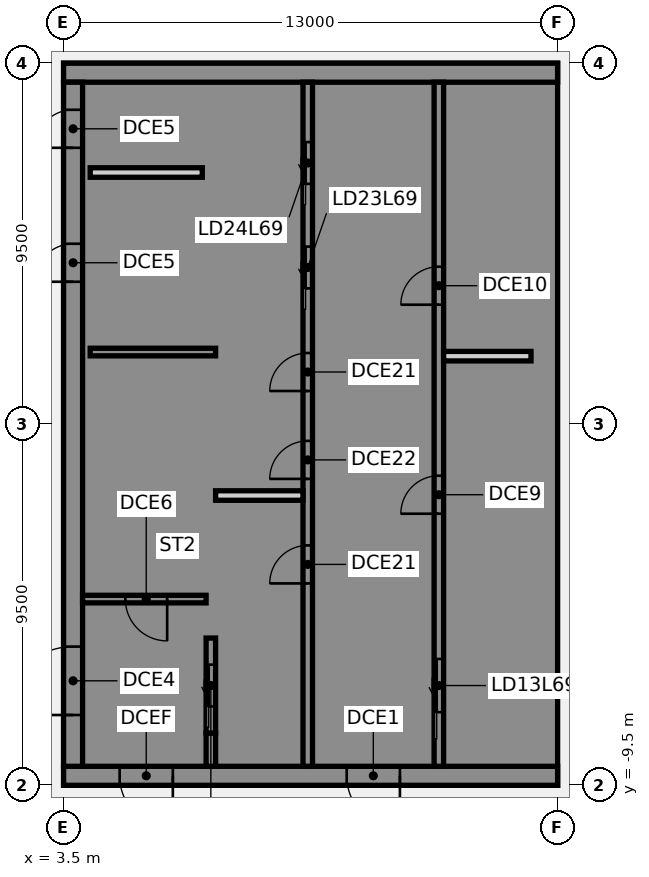
"""IFC4 building model, lengths in metres.
Left out: names, types, materials, properties, quantities, classifications, styles, units other than length and angle.
Written with IfcOpenShell. Run it as: python <this file> out.ifc"""

import sys

from ifc_helpers import new_model, si_unit, direction, frame, frame_2d, origin, place, context, subcontext, project, spatial, polyline, rectangle, outline, extrude, element, fill, save


model = new_model("IFC4")
c1 = context("Model", 3, precision=1e-05, world=origin(), true_north=direction((0.0, 1.0)))
c2 = subcontext(c1, "Body", "Model", "MODEL_VIEW")
j1 = project(units=[si_unit("LENGTHUNIT", "METRE"), si_unit("PLANEANGLEUNIT", "RADIAN")], contexts=[c1])
p1 = place(None, origin())
s1 = spatial("IfcSite", under=j1, at=p1, CompositionType="ELEMENT")
p2 = place(p1, origin())
s2 = spatial("IfcBuilding", under=s1, at=p2, CompositionType="ELEMENT")
p3 = place(p2, frame((0.0, 0.0, 271.2)))
s3 = spatial("IfcBuildingStorey", under=s2, at=p3, CompositionType="ELEMENT", Elevation=271.2)
p4 = place(p3, frame((16.5, -9.25, 0.0), z_axis=(0.0, 0.0, 1.0), x_axis=(-1.0, 0.0, 0.0)))
e1 = element("IfcWall", 1, at=p4, inside=s3, PredefinedType="SHEAR", context=c2, shape_type="SweptSolid", body=[
    extrude(rectangle(XDim=13.0, YDim=0.5, at=frame_2d((6.5, 0.0))), origin(), (0.0, 0.0, 1.0), 3.46),
])
p5 = place(p4, frame((4.15, 0.0, 0.0)))
e2 = element("IfcOpeningElement", 2, at=p5, cuts=e1, PredefinedType="OPENING", context=c2, shape_type="SweptSolid", body=[
    extrude(rectangle(XDim=1.4, YDim=2.1, at=frame_2d((0.7, 1.05))), frame((0.0, 0.26, 0.0), z_axis=(0.0, -1.0, 0.0), x_axis=(1.0, 0.0, 0.0)), (0.0, 0.0, 1.0), 0.52),
])
p6 = place(p4, frame((10.125, 0.0, 0.0)))
e3 = element("IfcOpeningElement", 3, at=p6, cuts=e1, PredefinedType="OPENING", context=c2, shape_type="SweptSolid", body=[
    extrude(rectangle(XDim=1.4, YDim=2.1, at=frame_2d((0.7, 1.05))), frame((0.0, 0.26, 0.0), z_axis=(0.0, -1.0, 0.0), x_axis=(1.0, 0.0, 0.0)), (0.0, 0.0, 1.0), 0.52),
])
p7 = place(p3, origin())
e4 = element("IfcWall", 4, at=p7, inside=s3, PredefinedType="SHEAR", context=c2, shape_type="SweptSolid", body=[
    extrude(outline(polyline([(13.5, -8.125), (13.5, -9.0), (16.0, -9.0), (16.5, -9.0), (16.5, 9.0), (16.0, 9.0), (13.5, 9.0), (13.5, 8.125), (16.0, 8.125), (16.0, 5.625), (13.5, 5.625), (13.5, 5.375), (16.0, 5.375), (16.0, -5.375), (13.5, -5.375), (13.5, -5.625), (16.0, -5.625), (16.0, -8.125), (13.5, -8.125)])), origin(), (0.0, 0.0, 1.0), 3.46),
])
p8 = place(p3, frame((16.5, 9.25, 0.0), z_axis=(0.0, 0.0, 1.0), x_axis=(-1.0, 0.0, 0.0)))
e5 = element("IfcWall", 5, at=p8, inside=s3, PredefinedType="SHEAR", context=c2, shape_type="SweptSolid", body=[
    extrude(rectangle(XDim=13.0, YDim=0.5, at=frame_2d((6.5, 0.0))), origin(), (0.0, 0.0, 1.0), 3.46),
])
p9 = place(p3, origin())
e6 = element("IfcWall", 6, at=p9, inside=s3, PredefinedType="SHEAR", context=c2, shape_type="SweptSolid", body=[
    extrude(outline(polyline([(9.8, -5.375), (7.5, -5.375), (7.5, 2.625), (9.8, 2.625), (9.8, 2.875), (7.5, 2.875), (7.5, 5.375), (9.8, 5.375), (9.8, 5.625), (7.5, 5.625), (7.5, 8.125), (9.8, 8.125), (9.8, 9.0), (7.5, 9.0), (7.25, 9.0), (7.25, -5.625), (7.5, -5.625), (9.8, -5.625), (9.8, -5.375)])), origin(), (0.0, 0.0, 1.0), 3.46),
])
p10 = place(p3, origin())
e7 = element("IfcWall", 7, at=p10, inside=s3, PredefinedType="SHEAR", context=c2, shape_type="SweptSolid", body=[
    extrude(outline(polyline([(7.5, -8.125), (7.5, -9.0), (9.8, -9.0), (9.8, -8.125), (9.8, -5.625), (9.55, -5.625), (9.55, -8.125), (7.5, -8.125)])), origin(), (0.0, 0.0, 1.0), 3.46),
])
p11 = place(p3, frame((7.375, -9.0, 0.0), z_axis=(0.0, 0.0, 1.0), x_axis=(0.0, 1.0, 0.0)))
e8 = element("IfcWall", 8, at=p11, inside=s3, PredefinedType="SHEAR", context=c2, shape_type="SweptSolid", body=[
    extrude(rectangle(XDim=0.875, YDim=0.25, at=frame_2d((0.438, 0.0))), origin(), (0.0, 0.0, 1.0), 3.46),
])
p12 = place(p3, frame((7.5, 1.9, 0.0), z_axis=(0.0, 0.0, 1.0), x_axis=(-1.0, 0.0, 0.0)))
e9 = element("IfcWall", 9, at=p12, inside=s3, PredefinedType="SHEAR", context=c2, shape_type="SweptSolid", body=[
    extrude(rectangle(XDim=3.3, YDim=0.2, at=frame_2d((1.65, 0.0))), origin(), (0.0, 0.0, 1.0), 3.46),
])
p13 = place(p3, frame((13.375, -9.0, 0.0), z_axis=(0.0, 0.0, 1.0), x_axis=(0.0, 1.0, 0.0)))
e10 = element("IfcWall", 10, at=p13, inside=s3, PredefinedType="SHEAR", context=c2, shape_type="SweptSolid", body=[
    extrude(rectangle(XDim=18.0, YDim=0.25, at=frame_2d((9.0, 0.0))), origin(), (0.0, 0.0, 1.0), 3.46),
])
p14 = place(p13, frame((1.425, 0.0, 0.0)))
e11 = element("IfcOpeningElement", 11, at=p14, cuts=e10, PredefinedType="OPENING", context=c2, shape_type="SweptSolid", body=[
    extrude(rectangle(XDim=1.4, YDim=2.1, at=frame_2d((0.7, 1.05))), frame((0.0, 0.135, 0.0), z_axis=(0.0, -1.0, 0.0), x_axis=(1.0, 0.0, 0.0)), (0.0, 0.0, 1.0), 0.27),
])
p15 = place(p13, frame((6.646, 0.0, 0.0)))
e12 = element("IfcOpeningElement", 12, at=p15, cuts=e10, PredefinedType="OPENING", context=c2, shape_type="SweptSolid", body=[
    extrude(rectangle(XDim=1.0, YDim=2.1, at=frame_2d((0.5, 1.05))), frame((0.0, 0.135, 0.0), z_axis=(0.0, -1.0, 0.0), x_axis=(1.0, 0.0, 0.0)), (0.0, 0.0, 1.0), 0.27),
])
p16 = place(p13, frame((12.146, 0.0, 0.0)))
e13 = element("IfcOpeningElement", 13, at=p16, cuts=e10, PredefinedType="OPENING", context=c2, shape_type="SweptSolid", body=[
    extrude(rectangle(XDim=1.0, YDim=2.1, at=frame_2d((0.5, 1.05))), frame((0.0, 0.135, 0.0), z_axis=(0.0, -1.0, 0.0), x_axis=(1.0, 0.0, 0.0)), (0.0, 0.0, 1.0), 0.27),
])
p17 = place(p3, frame((9.925, -9.0, 0.0), z_axis=(0.0, 0.0, 1.0), x_axis=(0.0, 1.0, 0.0)))
e14 = element("IfcWall", 14, at=p17, inside=s3, PredefinedType="SHEAR", context=c2, shape_type="SweptSolid", body=[
    extrude(rectangle(XDim=18.0, YDim=0.25, at=frame_2d((9.0, 0.0))), origin(), (0.0, 0.0, 1.0), 3.46),
])
p18 = place(p17, frame((12.575, 0.0, 0.0)))
e15 = element("IfcOpeningElement", 15, at=p18, cuts=e14, PredefinedType="OPENING", context=c2, shape_type="SweptSolid", body=[
    extrude(rectangle(XDim=1.1, YDim=2.1, at=frame_2d((0.55, 1.05))), frame((0.0, 0.135, 0.0), z_axis=(0.0, -1.0, 0.0), x_axis=(1.0, 0.0, 0.0)), (0.0, 0.0, 1.0), 0.27),
])
p19 = place(p17, frame((15.325, 0.0, 0.0)))
e16 = element("IfcOpeningElement", 16, at=p19, cuts=e14, PredefinedType="OPENING", context=c2, shape_type="SweptSolid", body=[
    extrude(rectangle(XDim=1.1, YDim=2.1, at=frame_2d((0.55, 1.05))), frame((0.0, 0.135, 0.0), z_axis=(0.0, -1.0, 0.0), x_axis=(1.0, 0.0, 0.0)), (0.0, 0.0, 1.0), 0.27),
])
p20 = place(p17, frame((4.812, 0.0, 0.0)))
e17 = element("IfcOpeningElement", 17, at=p20, cuts=e14, PredefinedType="OPENING", context=c2, shape_type="SweptSolid", body=[
    extrude(rectangle(XDim=1.0, YDim=2.1, at=frame_2d((0.5, 1.05))), frame((0.0, 0.135, 0.0), z_axis=(0.0, -1.0, 0.0), x_axis=(1.0, 0.0, 0.0)), (0.0, 0.0, 1.0), 0.27),
])
p21 = place(p17, frame((7.562, 0.0, 0.0)))
e18 = element("IfcOpeningElement", 18, at=p21, cuts=e14, PredefinedType="OPENING", context=c2, shape_type="SweptSolid", body=[
    extrude(rectangle(XDim=1.0, YDim=2.1, at=frame_2d((0.5, 1.05))), frame((0.0, 0.135, 0.0), z_axis=(0.0, -1.0, 0.0), x_axis=(1.0, 0.0, 0.0)), (0.0, 0.0, 1.0), 0.27),
])
p22 = place(p17, frame((9.875, 0.0, 0.0)))
e19 = element("IfcOpeningElement", 19, at=p22, cuts=e14, PredefinedType="OPENING", context=c2, shape_type="SweptSolid", body=[
    extrude(rectangle(XDim=1.0, YDim=2.1, at=frame_2d((0.5, 1.05))), frame((0.0, 0.135, 0.0), z_axis=(0.0, -1.0, 0.0), x_axis=(1.0, 0.0, 0.0)), (0.0, 0.0, 1.0), 0.27),
])
p23 = place(p3, frame((7.375, -8.125, 0.0), z_axis=(0.0, 0.0, 1.0), x_axis=(0.0, 1.0, 0.0)))
e20 = element("IfcWall", 20, at=p23, inside=s3, PredefinedType="SHEAR", context=c2, shape_type="SweptSolid", body=[
    extrude(rectangle(XDim=2.5, YDim=0.25, at=frame_2d((1.25, 0.0))), origin(), (0.0, 0.0, 1.0), 3.46),
])
p24 = place(p23, frame((0.7, 0.0, 0.0)))
e21 = element("IfcOpeningElement", 21, at=p24, cuts=e20, PredefinedType="OPENING", context=c2, shape_type="SweptSolid", body=[
    extrude(rectangle(XDim=1.1, YDim=2.1, at=frame_2d((0.55, 1.05))), frame((0.0, 0.135, 0.0), z_axis=(0.0, -1.0, 0.0), x_axis=(1.0, 0.0, 0.0)), (0.0, 0.0, 1.0), 0.27),
])
p25 = place(p3, frame((3.75, -9.0, 0.0), z_axis=(0.0, 0.0, 1.0), x_axis=(0.0, 1.0, 0.0)))
e22 = element("IfcWall", 22, at=p25, inside=s3, PredefinedType="SHEAR", context=c2, shape_type="SweptSolid", body=[
    extrude(rectangle(XDim=18.0, YDim=0.5, at=frame_2d((9.0, 0.0))), origin(), (0.0, 0.0, 1.0), 3.46),
])
p26 = place(p25, frame((1.35, 0.0, 0.0)))
e23 = element("IfcOpeningElement", 23, at=p26, cuts=e22, PredefinedType="OPENING", context=c2, shape_type="SweptSolid", body=[
    extrude(rectangle(XDim=1.8, YDim=2.1, at=frame_2d((0.9, 1.05))), frame((0.0, 0.26, 0.0), z_axis=(0.0, -1.0, 0.0), x_axis=(1.0, 0.0, 0.0)), (0.0, 0.0, 1.0), 0.52),
])
p27 = place(p25, frame((12.75, 0.0, 0.0)))
e24 = element("IfcOpeningElement", 24, at=p27, cuts=e22, PredefinedType="OPENING", context=c2, shape_type="SweptSolid", body=[
    extrude(rectangle(XDim=1.0, YDim=2.1, at=frame_2d((0.5, 1.05))), frame((0.0, 0.26, 0.0), z_axis=(0.0, -1.0, 0.0), x_axis=(1.0, 0.0, 0.0)), (0.0, 0.0, 1.0), 0.52),
])
p28 = place(p25, frame((16.274, 0.0, 0.0)))
e25 = element("IfcOpeningElement", 25, at=p28, cuts=e22, PredefinedType="OPENING", context=c2, shape_type="SweptSolid", body=[
    extrude(rectangle(XDim=1.0, YDim=2.1, at=frame_2d((0.5, 1.05))), frame((0.0, 0.26, 0.0), z_axis=(0.0, -1.0, 0.0), x_axis=(1.0, 0.0, 0.0)), (0.0, 0.0, 1.0), 0.52),
])
p29 = place(p3, frame((7.15, 6.624, 0.0), z_axis=(0.0, 0.0, 1.0), x_axis=(-1.0, 0.0, 0.0)))
e26 = element("IfcWall", 26, at=p29, inside=s3, PredefinedType="PARTITIONING", context=c2, shape_type="SweptSolid", body=[
    extrude(rectangle(XDim=2.95, YDim=0.25, at=frame_2d((1.475, 0.0))), origin(), (0.0, 0.0, 1.0), 3.46),
])
p30 = place(p3, frame((7.25, -4.6, 0.0), z_axis=(0.0, 0.0, 1.0), x_axis=(-1.0, 0.0, 0.0)))
e27 = element("IfcWall", 27, at=p30, inside=s3, PredefinedType="SHEAR", context=c2, shape_type="SweptSolid", body=[
    extrude(rectangle(XDim=3.25, YDim=0.2, at=frame_2d((1.625, 0.0))), origin(), (0.0, 0.0, 1.0), 3.46),
])
p31 = place(p30, frame((1.025, 0.0, 0.0)))
e28 = element("IfcOpeningElement", 28, at=p31, cuts=e27, PredefinedType="OPENING", context=c2, shape_type="SweptSolid", body=[
    extrude(rectangle(XDim=1.1, YDim=2.1, at=frame_2d((0.55, 1.05))), frame((0.0, 0.11, 0.0), z_axis=(0.0, -1.0, 0.0), x_axis=(1.0, 0.0, 0.0)), (0.0, 0.0, 1.0), 0.22),
])
for number, where, z_axis, x_axis in (
    (29, (15.8, 1.792, 0.0), (0.0, 0.0, 1.0), (-1.0, 0.0, 0.0)),
    (30, (9.8, -1.875, 0.0), (0.0, 0.0, 1.0), (-1.0, 0.0, 0.0)),
):
    element("IfcWall", number, at=place(p3, frame(where, z_axis=z_axis, x_axis=x_axis)), inside=s3, PredefinedType="PARTITIONING", context=c2, shape_type="SweptSolid", body=[
        extrude(rectangle(XDim=2.3, YDim=0.25, at=frame_2d((1.15, 0.0))), origin(), (0.0, 0.0, 1.0), 3.46),
    ])
p32 = place(p5, origin())
e31 = element("IfcDoor", 31, at=p32, inside=s3, OperationType="SINGLE_SWING_LEFT", PredefinedType="DOOR", context=c2, shape_type="SweptSolid", body=[
    extrude(rectangle(XDim=1.4, YDim=2.1, at=frame_2d((0.7, 1.05))), frame((0.0, 0.025, 0.0), z_axis=(0.0, -1.0, 0.0), x_axis=(1.0, 0.0, 0.0)), (0.0, 0.0, 1.0), 0.05),
])
fill(e2, e31)
p33 = place(p6, origin())
e32 = element("IfcDoor", 32, at=p33, inside=s3, OperationType="SINGLE_SWING_LEFT", PredefinedType="DOOR", context=c2, shape_type="SweptSolid", body=[
    extrude(rectangle(XDim=1.4, YDim=2.1, at=frame_2d((0.7, 1.05))), frame((0.0, 0.025, 0.0), z_axis=(0.0, -1.0, 0.0), x_axis=(1.0, 0.0, 0.0)), (0.0, 0.0, 1.0), 0.05),
])
fill(e3, e32)
p34 = place(p26, origin())
e33 = element("IfcDoor", 33, at=p34, inside=s3, OperationType="SINGLE_SWING_LEFT", PredefinedType="DOOR", context=c2, shape_type="SweptSolid", body=[
    extrude(rectangle(XDim=1.8, YDim=2.1, at=frame_2d((0.9, 1.05))), frame((0.0, 0.025, 0.0), z_axis=(0.0, -1.0, 0.0), x_axis=(1.0, 0.0, 0.0)), (0.0, 0.0, 1.0), 0.05),
])
fill(e23, e33)
p35 = place(p27, origin())
e34 = element("IfcDoor", 34, at=p35, inside=s3, OperationType="SINGLE_SWING_LEFT", PredefinedType="DOOR", context=c2, shape_type="SweptSolid", body=[
    extrude(rectangle(XDim=1.0, YDim=2.1, at=frame_2d((0.5, 1.05))), frame((0.0, -0.175, 0.0), z_axis=(0.0, -1.0, 0.0), x_axis=(1.0, 0.0, 0.0)), (0.0, 0.0, 1.0), 0.05),
])
fill(e24, e34)
p36 = place(p28, origin())
e35 = element("IfcDoor", 35, at=p36, inside=s3, OperationType="SINGLE_SWING_LEFT", PredefinedType="DOOR", context=c2, shape_type="SweptSolid", body=[
    extrude(rectangle(XDim=1.0, YDim=2.1, at=frame_2d((0.5, 1.05))), frame((0.0, -0.175, 0.0), z_axis=(0.0, -1.0, 0.0), x_axis=(1.0, 0.0, 0.0)), (0.0, 0.0, 1.0), 0.05),
])
fill(e25, e35)
p37 = place(p31, origin())
e36 = element("IfcDoor", 36, at=p37, inside=s3, OperationType="SINGLE_SWING_LEFT", PredefinedType="DOOR", context=c2, shape_type="SweptSolid", body=[
    extrude(rectangle(XDim=1.1, YDim=2.1, at=frame_2d((0.55, 1.05))), frame((0.0, 0.025, 0.0), z_axis=(0.0, -1.0, 0.0), x_axis=(1.0, 0.0, 0.0)), (0.0, 0.0, 1.0), 0.05),
])
fill(e28, e36)
p38 = place(p14, origin())
e37 = element("IfcDoor", 37, at=p38, inside=s3, OperationType="SLIDING_TO_LEFT", PredefinedType="DOOR", context=c2, shape_type="SweptSolid", body=[
    extrude(rectangle(XDim=1.4, YDim=2.1, at=frame_2d((0.7, 1.05))), frame((0.0, 0.025, 0.0), z_axis=(0.0, -1.0, 0.0), x_axis=(1.0, 0.0, 0.0)), (0.0, 0.0, 1.0), 0.05),
])
fill(e11, e37)
p39 = place(p24, origin())
e38 = element("IfcDoor", 38, at=p39, inside=s3, OperationType="SLIDING_TO_LEFT", PredefinedType="DOOR", context=c2, shape_type="SweptSolid", body=[
    extrude(rectangle(XDim=1.1, YDim=2.1, at=frame_2d((0.55, 1.05))), frame((0.0, 0.025, 0.0), z_axis=(0.0, -1.0, 0.0), x_axis=(1.0, 0.0, 0.0)), (0.0, 0.0, 1.0), 0.05),
])
fill(e21, e38)
p40 = place(p18, origin())
e39 = element("IfcDoor", 39, at=p40, inside=s3, OperationType="SLIDING_TO_LEFT", PredefinedType="DOOR", context=c2, shape_type="SweptSolid", body=[
    extrude(rectangle(XDim=1.1, YDim=2.1, at=frame_2d((0.55, 1.05))), frame((0.0, 0.025, 0.0), z_axis=(0.0, -1.0, 0.0), x_axis=(1.0, 0.0, 0.0)), (0.0, 0.0, 1.0), 0.05),
])
fill(e15, e39)
p41 = place(p19, origin())
e40 = element("IfcDoor", 40, at=p41, inside=s3, OperationType="SLIDING_TO_LEFT", PredefinedType="DOOR", context=c2, shape_type="SweptSolid", body=[
    extrude(rectangle(XDim=1.1, YDim=2.1, at=frame_2d((0.55, 1.05))), frame((0.0, 0.025, 0.0), z_axis=(0.0, -1.0, 0.0), x_axis=(1.0, 0.0, 0.0)), (0.0, 0.0, 1.0), 0.05),
])
fill(e16, e40)
p42 = place(p15, origin())
e41 = element("IfcDoor", 41, at=p42, inside=s3, OperationType="SINGLE_SWING_LEFT", PredefinedType="DOOR", context=c2, shape_type="SweptSolid", body=[
    extrude(rectangle(XDim=1.0, YDim=2.1, at=frame_2d((0.5, 1.05))), frame((0.0, 0.025, 0.0), z_axis=(0.0, -1.0, 0.0), x_axis=(1.0, 0.0, 0.0)), (0.0, 0.0, 1.0), 0.05),
])
fill(e12, e41)
p43 = place(p16, origin())
e42 = element("IfcDoor", 42, at=p43, inside=s3, OperationType="SINGLE_SWING_LEFT", PredefinedType="DOOR", context=c2, shape_type="SweptSolid", body=[
    extrude(rectangle(XDim=1.0, YDim=2.1, at=frame_2d((0.5, 1.05))), frame((0.0, 0.025, 0.0), z_axis=(0.0, -1.0, 0.0), x_axis=(1.0, 0.0, 0.0)), (0.0, 0.0, 1.0), 0.05),
])
fill(e13, e42)
p44 = place(p20, origin())
e43 = element("IfcDoor", 43, at=p44, inside=s3, OperationType="SINGLE_SWING_LEFT", PredefinedType="DOOR", context=c2, shape_type="SweptSolid", body=[
    extrude(rectangle(XDim=1.0, YDim=2.1, at=frame_2d((0.5, 1.05))), frame((0.0, 0.025, 0.0), z_axis=(0.0, -1.0, 0.0), x_axis=(1.0, 0.0, 0.0)), (0.0, 0.0, 1.0), 0.05),
])
fill(e17, e43)
p45 = place(p21, origin())
e44 = element("IfcDoor", 44, at=p45, inside=s3, OperationType="SINGLE_SWING_LEFT", PredefinedType="DOOR", context=c2, shape_type="SweptSolid", body=[
    extrude(rectangle(XDim=1.0, YDim=2.1, at=frame_2d((0.5, 1.05))), frame((0.0, 0.025, 0.0), z_axis=(0.0, -1.0, 0.0), x_axis=(1.0, 0.0, 0.0)), (0.0, 0.0, 1.0), 0.05),
])
fill(e18, e44)
p46 = place(p22, origin())
e45 = element("IfcDoor", 45, at=p46, inside=s3, OperationType="SINGLE_SWING_LEFT", PredefinedType="DOOR", context=c2, shape_type="SweptSolid", body=[
    extrude(rectangle(XDim=1.0, YDim=2.1, at=frame_2d((0.5, 1.05))), frame((0.0, 0.025, 0.0), z_axis=(0.0, -1.0, 0.0), x_axis=(1.0, 0.0, 0.0)), (0.0, 0.0, 1.0), 0.05),
])
fill(e19, e45)
save(model, sys.argv[1])
